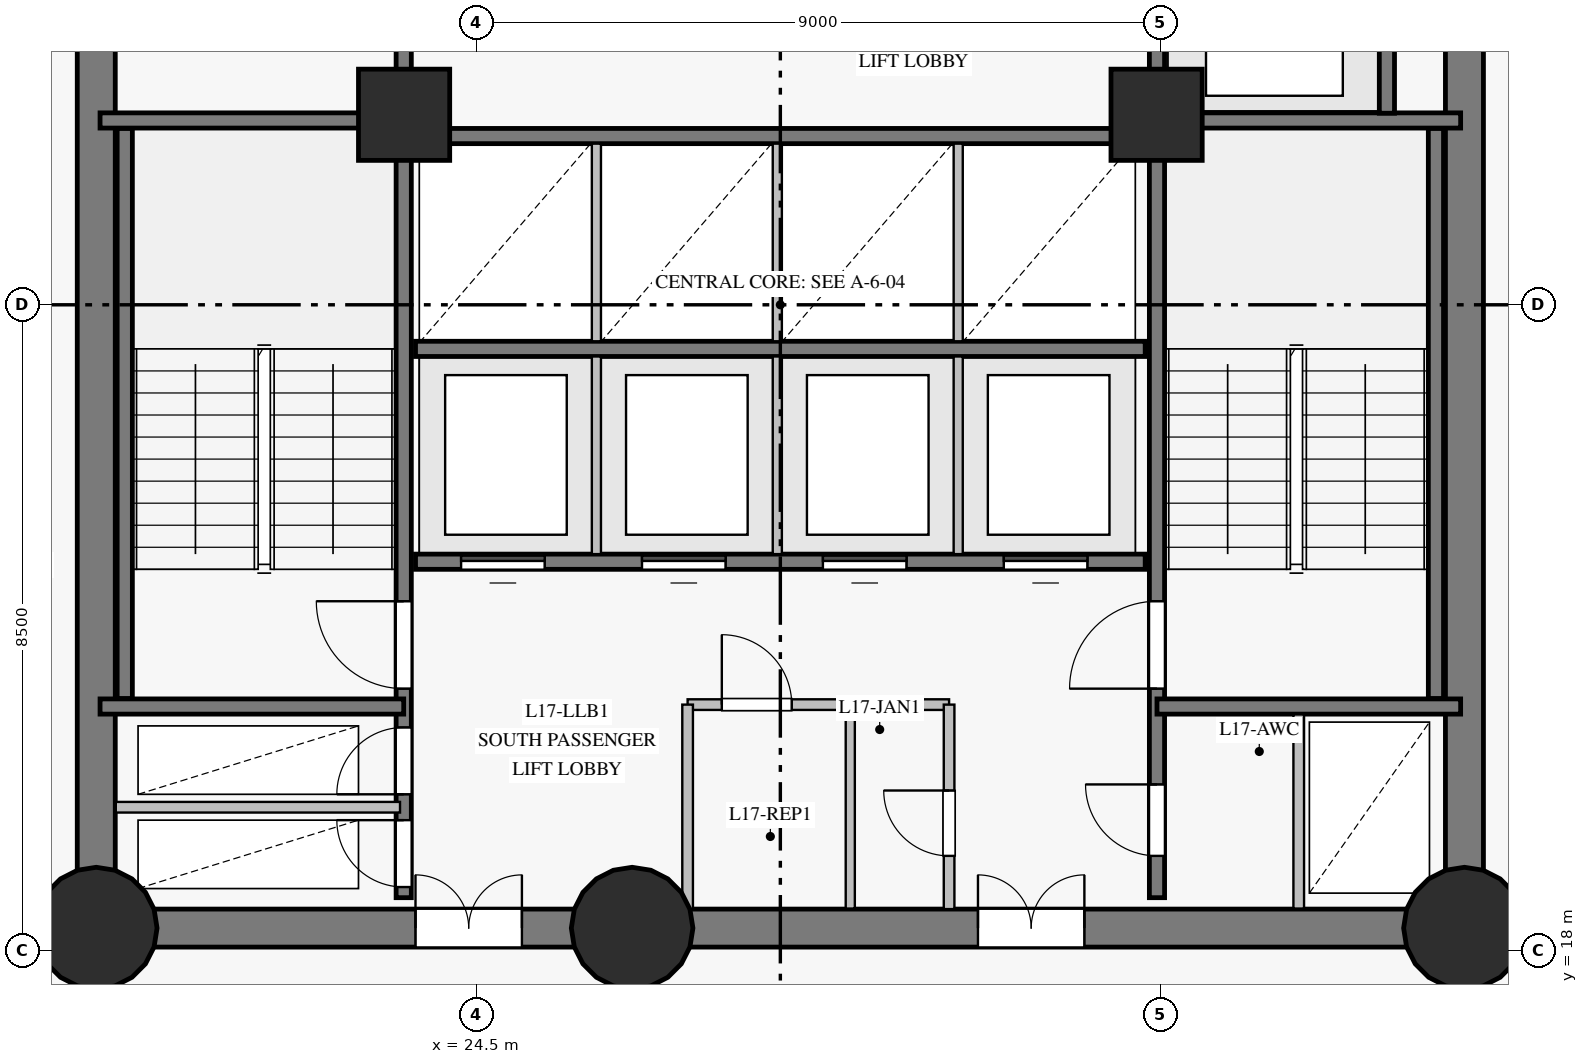
"""IFC4 building model, lengths in metres.
Left out: names, types, materials, properties, quantities, classifications, styles, units other than length and angle.
Written with IfcOpenShell. Run it as: python <this file> out.ifc"""

import sys

from ifc_helpers import new_model, si_unit, direction, frame, frame_2d, origin, origin_with_axes, origin_2d, place, context, subcontext, project, spatial, rectangle, circle, extrude, source, transform, mapped, element, fill, save


model = new_model("IFC4")
c1 = context("Model", 3, precision=1e-05, world=origin(), true_north=direction((0.0, 1.0)))
c2 = subcontext(c1, "Body", "Model", "MODEL_VIEW")
j1 = project(units=[si_unit("LENGTHUNIT", "METRE"), si_unit("PLANEANGLEUNIT", "RADIAN")], contexts=[c1])
p1 = place(None, origin())
s1 = spatial("IfcSite", under=j1, at=p1, CompositionType="ELEMENT")
p2 = place(p1, origin())
s2 = spatial("IfcBuilding", under=s1, at=p2, CompositionType="ELEMENT")
p3 = place(p2, frame((0.0, 0.0, 66.1)))
s3 = spatial("IfcBuildingStorey", under=s2, at=p3, CompositionType="ELEMENT", Elevation=66.1)
p4 = place(p3, frame((19.5, 18.3, 0.0), z_axis=(0.0, 0.0, 1.0), x_axis=(1.0, 0.0, 0.0)))
e1 = element("IfcWall", 1, at=p4, inside=s3, PredefinedType="SHEAR", context=c2, shape_type="SweptSolid", body=[
    extrude(rectangle(XDim=7.05, YDim=0.5, at=frame_2d((3.525, 0.0))), origin(), (0.0, 0.0, 1.0), 3.35),
])
p5 = place(p4, frame((4.2, 0.0, 0.0)))
e2 = element("IfcOpeningElement", 2, at=p5, cuts=e1, PredefinedType="OPENING", context=c2, shape_type="SweptSolid", body=[
    extrude(rectangle(XDim=1.4, YDim=2.2, at=frame_2d((0.7, 1.1))), frame((0.0, 0.26, 0.0), z_axis=(0.0, -1.0, 0.0), x_axis=(1.0, 0.0, 0.0)), (0.0, 0.0, 1.0), 0.52),
])
p6 = place(p3, frame((26.55, 18.3, 0.0), z_axis=(0.0, 0.0, 1.0), x_axis=(1.0, 0.0, 0.0)))
e3 = element("IfcWall", 3, at=p6, inside=s3, PredefinedType="SHEAR", context=c2, shape_type="SweptSolid", body=[
    extrude(rectangle(XDim=10.95, YDim=0.5, at=frame_2d((5.475, 0.0))), origin(), (0.0, 0.0, 1.0), 3.35),
])
p7 = place(p6, frame((4.55, 0.0, 0.0)))
e4 = element("IfcOpeningElement", 4, at=p7, cuts=e3, PredefinedType="OPENING", context=c2, shape_type="SweptSolid", body=[
    extrude(rectangle(XDim=1.4, YDim=2.2, at=frame_2d((0.7, 1.1))), frame((0.0, 0.26, 0.0), z_axis=(0.0, -1.0, 0.0), x_axis=(1.0, 0.0, 0.0)), (0.0, 0.0, 1.0), 0.52),
])
p8 = place(p3, frame((37.5, 18.3, 0.0), z_axis=(0.0, 0.0, 1.0), x_axis=(0.0, 1.0, 0.0)))
e5 = element("IfcWall", 5, at=p8, inside=s3, PredefinedType="SHEAR", context=c2, shape_type="SweptSolid", body=[
    extrude(rectangle(XDim=16.4, YDim=0.5, at=frame_2d((8.2, 0.0))), origin(), (0.0, 0.0, 1.0), 3.35),
])
p9 = place(p8, frame((14.06, 0.0, 0.0)))
e6 = element("IfcOpeningElement", 6, at=p9, cuts=e5, PredefinedType="OPENING", context=c2, shape_type="SweptSolid", body=[
    extrude(rectangle(XDim=1.2, YDim=2.15, at=frame_2d((0.6, 1.075))), frame((0.0, 0.26, 0.0), z_axis=(0.0, -1.0, 0.0), x_axis=(1.0, 0.0, 0.0)), (0.0, 0.0, 1.0), 0.52),
])
p10 = place(p3, frame((19.5, 34.7, 0.0), z_axis=(0.0, 0.0, 1.0), x_axis=(0.0, -1.0, 0.0)))
e7 = element("IfcWall", 7, at=p10, inside=s3, PredefinedType="SHEAR", context=c2, shape_type="SweptSolid", body=[
    extrude(rectangle(XDim=16.4, YDim=0.5, at=frame_2d((8.2, 0.0))), origin(), (0.0, 0.0, 1.0), 3.35),
])
p11 = place(p10, frame((3.1, 0.0, 0.0)))
e8 = element("IfcOpeningElement", 8, at=p11, cuts=e7, PredefinedType="OPENING", context=c2, shape_type="SweptSolid", body=[
    extrude(rectangle(XDim=1.1, YDim=2.15, at=frame_2d((0.55, 1.075))), frame((0.0, 0.26, 0.0), z_axis=(0.0, -1.0, 0.0), x_axis=(1.0, 0.0, 0.0)), (0.0, 0.0, 1.0), 0.52),
])
m1 = source(origin_with_axes(), c2, "Body", "SweptSolid", [
    extrude(circle(Radius=0.8, at=origin_2d()), origin(), (0.0, 0.0, 1.0), 3.6),
])
for number, where, z_axis, x_axis in (
    (9, (19.5, 18.3, 0.0), (0.0, 0.0, 1.0), (1.0, 0.0, 0.0)),
    (10, (26.55, 18.3, 0.0), (0.0, 0.0, 1.0), (1.0, 0.0, 0.0)),
    (11, (37.5, 18.3, 0.0), (0.0, 0.0, 1.0), (1.0, 0.0, 0.0)),
):
    element("IfcColumn", number, at=place(p3, frame(where, z_axis=z_axis, x_axis=x_axis)), inside=s3, PredefinedType="COLUMN", context=c2, shape_type="MappedRepresentation", body=[
        mapped(m1, transform((0.0, 0.0, 0.0), scale=1.0)),
    ])
m2 = source(origin_with_axes(), c2, "Body", "SweptSolid", [
    extrude(rectangle(XDim=1.2, YDim=1.2, at=origin_2d()), origin(), (0.0, 0.0, 1.0), 3.6),
])
for number, where, z_axis, x_axis in (
    (12, (23.55, 29.0, 0.0), (0.0, 0.0, 1.0), (1.0, 0.0, 0.0)),
    (13, (33.45, 29.0, 0.0), (0.0, 0.0, 1.0), (1.0, 0.0, 0.0)),
):
    element("IfcColumn", number, at=place(p3, frame(where, z_axis=z_axis, x_axis=x_axis)), inside=s3, PredefinedType="COLUMN", context=c2, shape_type="MappedRepresentation", body=[
        mapped(m2, transform((0.0, 0.0, 0.0), scale=1.0)),
    ])
p12 = place(p3, frame((23.545, 18.7, 0.0), z_axis=(0.0, 0.0, 1.0), x_axis=(0.0, 1.0, 0.0)))
e14 = element("IfcWall", 14, at=p12, inside=s3, PredefinedType="SHEAR", context=c2, shape_type="SweptSolid", body=[
    extrude(rectangle(XDim=15.6, YDim=0.2, at=frame_2d((7.8, 0.0))), origin(), (0.0, 0.0, 1.0), 3.35),
])
p13 = place(p12, frame((2.75, 0.0, 0.0)))
e15 = element("IfcOpeningElement", 15, at=p13, cuts=e14, PredefinedType="OPENING", context=c2, shape_type="SweptSolid", body=[
    extrude(rectangle(XDim=1.15, YDim=2.15, at=frame_2d((0.575, 1.075))), frame((0.0, 0.11, 0.0), z_axis=(0.0, -1.0, 0.0), x_axis=(1.0, 0.0, 0.0)), (0.0, 0.0, 1.0), 0.22),
])
p14 = place(p12, frame((0.14, 0.0, 0.0)))
e16 = element("IfcOpeningElement", 16, at=p14, cuts=e14, PredefinedType="OPENING", context=c2, shape_type="SweptSolid", body=[
    extrude(rectangle(XDim=0.88, YDim=2.1, at=frame_2d((0.44, 1.05))), frame((0.0, 0.11, 0.0), z_axis=(0.0, -1.0, 0.0), x_axis=(1.0, 0.0, 0.0)), (0.0, 0.0, 1.0), 0.22),
])
p15 = place(p12, frame((1.36, 0.0, 0.0)))
e17 = element("IfcOpeningElement", 17, at=p15, cuts=e14, PredefinedType="OPENING", context=c2, shape_type="SweptSolid", body=[
    extrude(rectangle(XDim=0.88, YDim=2.1, at=frame_2d((0.44, 1.05))), frame((0.0, 0.11, 0.0), z_axis=(0.0, -1.0, 0.0), x_axis=(1.0, 0.0, 0.0)), (0.0, 0.0, 1.0), 0.22),
])
p16 = place(p12, frame((12.1, 0.0, 0.0)))
e18 = element("IfcOpeningElement", 18, at=p16, cuts=e14, PredefinedType="OPENING", context=c2, shape_type="SweptSolid", body=[
    extrude(rectangle(XDim=1.12, YDim=2.15, at=frame_2d((0.56, 1.075))), frame((0.0, 0.11, 0.0), z_axis=(0.0, -1.0, 0.0), x_axis=(1.0, 0.0, 0.0)), (0.0, 0.0, 1.0), 0.22),
])
p17 = place(p12, frame((14.05, 0.0, 0.0)))
e19 = element("IfcOpeningElement", 19, at=p17, cuts=e14, PredefinedType="OPENING", context=c2, shape_type="SweptSolid", body=[
    extrude(rectangle(XDim=1.12, YDim=2.15, at=frame_2d((0.56, 1.075))), frame((0.0, 0.11, 0.0), z_axis=(0.0, -1.0, 0.0), x_axis=(1.0, 0.0, 0.0)), (0.0, 0.0, 1.0), 0.22),
])
p18 = place(p3, frame((33.455, 18.7, 0.0), z_axis=(0.0, 0.0, 1.0), x_axis=(0.0, 1.0, 0.0)))
e20 = element("IfcWall", 20, at=p18, inside=s3, PredefinedType="SHEAR", context=c2, shape_type="SweptSolid", body=[
    extrude(rectangle(XDim=15.6, YDim=0.2, at=frame_2d((7.8, 0.0))), origin(), (0.0, 0.0, 1.0), 3.35),
])
p19 = place(p18, frame((2.75, 0.0, 0.0)))
e21 = element("IfcOpeningElement", 21, at=p19, cuts=e20, PredefinedType="OPENING", context=c2, shape_type="SweptSolid", body=[
    extrude(rectangle(XDim=1.15, YDim=2.15, at=frame_2d((0.575, 1.075))), frame((0.0, 0.11, 0.0), z_axis=(0.0, -1.0, 0.0), x_axis=(1.0, 0.0, 0.0)), (0.0, 0.0, 1.0), 0.22),
])
p20 = place(p18, frame((0.55, 0.0, 0.0)))
e22 = element("IfcOpeningElement", 22, at=p20, cuts=e20, PredefinedType="OPENING", context=c2, shape_type="SweptSolid", body=[
    extrude(rectangle(XDim=0.94, YDim=2.1, at=frame_2d((0.47, 1.05))), frame((0.0, 0.11, 0.0), z_axis=(0.0, -1.0, 0.0), x_axis=(1.0, 0.0, 0.0)), (0.0, 0.0, 1.0), 0.22),
])
p21 = place(p3, frame((23.7, 23.12, 0.0), z_axis=(0.0, 0.0, 1.0), x_axis=(1.0, 0.0, 0.0)))
e23 = element("IfcWall", 23, at=p21, inside=s3, PredefinedType="SHEAR", context=c2, shape_type="SweptSolid", body=[
    extrude(rectangle(XDim=9.6, YDim=0.2, at=frame_2d((4.8, 0.0))), origin(), (0.0, 0.0, 1.0), 3.35),
])
p22 = place(p21, frame((0.6, 0.0, 0.0)))
e24 = element("IfcOpeningElement", 24, at=p22, cuts=e23, PredefinedType="OPENING", context=c2, shape_type="SweptSolid", body=[
    extrude(rectangle(XDim=1.1, YDim=2.15, at=frame_2d((0.55, 1.075))), frame((0.0, 0.11, 0.0), z_axis=(0.0, -1.0, 0.0), x_axis=(1.0, 0.0, 0.0)), (0.0, 0.0, 1.0), 0.22),
])
p23 = place(p21, frame((2.98, 0.0, 0.0)))
e25 = element("IfcOpeningElement", 25, at=p23, cuts=e23, PredefinedType="OPENING", context=c2, shape_type="SweptSolid", body=[
    extrude(rectangle(XDim=1.1, YDim=2.15, at=frame_2d((0.55, 1.075))), frame((0.0, 0.11, 0.0), z_axis=(0.0, -1.0, 0.0), x_axis=(1.0, 0.0, 0.0)), (0.0, 0.0, 1.0), 0.22),
])
p24 = place(p21, frame((5.36, 0.0, 0.0)))
e26 = element("IfcOpeningElement", 26, at=p24, cuts=e23, PredefinedType="OPENING", context=c2, shape_type="SweptSolid", body=[
    extrude(rectangle(XDim=1.1, YDim=2.15, at=frame_2d((0.55, 1.075))), frame((0.0, 0.11, 0.0), z_axis=(0.0, -1.0, 0.0), x_axis=(1.0, 0.0, 0.0)), (0.0, 0.0, 1.0), 0.22),
])
p25 = place(p21, frame((7.74, 0.0, 0.0)))
e27 = element("IfcOpeningElement", 27, at=p25, cuts=e23, PredefinedType="OPENING", context=c2, shape_type="SweptSolid", body=[
    extrude(rectangle(XDim=1.1, YDim=2.15, at=frame_2d((0.55, 1.075))), frame((0.0, 0.11, 0.0), z_axis=(0.0, -1.0, 0.0), x_axis=(1.0, 0.0, 0.0)), (0.0, 0.0, 1.0), 0.22),
])
for number, where, z_axis, x_axis in (
    (28, (23.7, 25.92, 0.0), (0.0, 0.0, 1.0), (1.0, 0.0, 0.0)),
    (29, (23.7, 28.72, 0.0), (0.0, 0.0, 1.0), (1.0, 0.0, 0.0)),
):
    element("IfcWall", number, at=place(p3, frame(where, z_axis=z_axis, x_axis=x_axis)), inside=s3, PredefinedType="SHEAR", context=c2, shape_type="SweptSolid", body=[
        extrude(rectangle(XDim=9.6, YDim=0.2, at=frame_2d((4.8, 0.0))), origin(), (0.0, 0.0, 1.0), 3.35),
    ])
for number, where, z_axis, x_axis in (
    (30, (19.875, 21.32, 0.0), (0.0, 0.0, 1.0), (0.0, 1.0, 0.0)),
    (31, (37.125, 21.32, 0.0), (0.0, 0.0, 1.0), (0.0, 1.0, 0.0)),
):
    element("IfcWall", number, at=place(p3, frame(where, z_axis=z_axis, x_axis=x_axis)), inside=s3, PredefinedType="SHEAR", context=c2, shape_type="SweptSolid", body=[
        extrude(rectangle(XDim=7.5, YDim=0.2, at=frame_2d((3.75, 0.0))), origin(), (0.0, 0.0, 1.0), 3.35),
    ])
for number, where, z_axis, x_axis in (
    (32, (33.455, 21.215, 0.0), (0.0, 0.0, 1.0), (1.0, 0.0, 0.0)),
    (33, (33.455, 28.925, 0.0), (0.0, 0.0, 1.0), (1.0, 0.0, 0.0)),
    (34, (19.55, 21.215, 0.0), (0.0, 0.0, 1.0), (1.0, 0.0, 0.0)),
    (35, (19.55, 28.925, 0.0), (0.0, 0.0, 1.0), (1.0, 0.0, 0.0)),
):
    element("IfcWall", number, at=place(p3, frame(where, z_axis=z_axis, x_axis=x_axis)), inside=s3, PredefinedType="SHEAR", context=c2, shape_type="SweptSolid", body=[
        extrude(rectangle(XDim=3.995, YDim=0.2, at=frame_2d((1.998, 0.0))), origin(), (0.0, 0.0, 1.0), 3.35),
    ])
p26 = place(p3, frame((36.48, 29.02, 0.0), z_axis=(0.0, 0.0, 1.0), x_axis=(0.0, 1.0, 0.0)))
e36 = element("IfcWall", 36, at=p26, inside=s3, PredefinedType="SHEAR", context=c2, shape_type="SweptSolid", body=[
    extrude(rectangle(XDim=2.86, YDim=0.2, at=frame_2d((1.43, 0.0))), origin(), (0.0, 0.0, 1.0), 3.35),
])
p27 = place(p3, frame((19.757, 19.89, 0.0), z_axis=(0.0, 0.0, 1.0), x_axis=(1.0, 0.0, 0.0)))
e37 = element("IfcWall", 37, at=p27, inside=s3, PredefinedType="PARTITIONING", context=c2, shape_type="SweptSolid", body=[
    extrude(rectangle(XDim=3.739, YDim=0.14, at=frame_2d((1.87, 0.0))), origin(), (0.0, 0.0, 1.0), 3.35),
])
p28 = place(p3, frame((27.28, 21.24, 0.0), z_axis=(0.0, 0.0, 1.0), x_axis=(1.0, 0.0, 0.0)))
e38 = element("IfcWall", 38, at=p28, inside=s3, PredefinedType="PARTITIONING", context=c2, shape_type="SweptSolid", body=[
    extrude(rectangle(XDim=3.44, YDim=0.14, at=frame_2d((1.72, 0.0))), origin(), (0.0, 0.0, 1.0), 3.35),
])
p29 = place(p28, frame((0.45, 0.0, 0.0)))
e39 = element("IfcOpeningElement", 39, at=p29, cuts=e38, PredefinedType="OPENING", context=c2, shape_type="SweptSolid", body=[
    extrude(rectangle(XDim=0.92, YDim=2.1, at=frame_2d((0.46, 1.05))), frame((0.0, 0.08, 0.0), z_axis=(0.0, -1.0, 0.0), x_axis=(1.0, 0.0, 0.0)), (0.0, 0.0, 1.0), 0.16),
])
p30 = place(p3, frame((27.28, 18.55, 0.0), z_axis=(0.0, 0.0, 1.0), x_axis=(0.0, 1.0, 0.0)))
e40 = element("IfcWall", 40, at=p30, inside=s3, PredefinedType="PARTITIONING", context=c2, shape_type="SweptSolid", body=[
    extrude(rectangle(XDim=2.69, YDim=0.14, at=frame_2d((1.345, 0.0))), origin(), (0.0, 0.0, 1.0), 3.35),
])
p31 = place(p3, frame((30.72, 18.55, 0.0), z_axis=(0.0, 0.0, 1.0), x_axis=(0.0, 1.0, 0.0)))
e41 = element("IfcWall", 41, at=p31, inside=s3, PredefinedType="PARTITIONING", context=c2, shape_type="SweptSolid", body=[
    extrude(rectangle(XDim=2.69, YDim=0.14, at=frame_2d((1.345, 0.0))), origin(), (0.0, 0.0, 1.0), 3.35),
])
p32 = place(p31, frame((0.7, 0.0, 0.0)))
e42 = element("IfcOpeningElement", 42, at=p32, cuts=e41, PredefinedType="OPENING", context=c2, shape_type="SweptSolid", body=[
    extrude(rectangle(XDim=0.86, YDim=2.1, at=frame_2d((0.43, 1.05))), frame((0.0, 0.08, 0.0), z_axis=(0.0, -1.0, 0.0), x_axis=(1.0, 0.0, 0.0)), (0.0, 0.0, 1.0), 0.16),
])
for number, where, z_axis, x_axis in (
    (43, (26.08, 23.22, 0.0), (0.0, 0.0, 1.0), (0.0, 1.0, 0.0)),
    (44, (28.46, 23.22, 0.0), (0.0, 0.0, 1.0), (0.0, 1.0, 0.0)),
    (45, (30.84, 23.22, 0.0), (0.0, 0.0, 1.0), (0.0, 1.0, 0.0)),
    (46, (26.08, 26.02, 0.0), (0.0, 0.0, 1.0), (0.0, 1.0, 0.0)),
    (47, (28.46, 26.02, 0.0), (0.0, 0.0, 1.0), (0.0, 1.0, 0.0)),
    (48, (30.84, 26.02, 0.0), (0.0, 0.0, 1.0), (0.0, 1.0, 0.0)),
):
    element("IfcWall", number, at=place(p3, frame(where, z_axis=z_axis, x_axis=x_axis)), inside=s3, PredefinedType="PARTITIONING", context=c2, shape_type="SweptSolid", body=[
        extrude(rectangle(XDim=2.6, YDim=0.12, at=frame_2d((1.3, 0.0))), origin(), (0.0, 0.0, 1.0), 3.35),
    ])
p33 = place(p3, frame((29.42, 18.557, 0.0), z_axis=(0.0, 0.0, 1.0), x_axis=(0.0, 1.0, 0.0)))
e49 = element("IfcWall", 49, at=p33, inside=s3, PredefinedType="PARTITIONING", context=c2, shape_type="SweptSolid", body=[
    extrude(rectangle(XDim=2.611, YDim=0.12, at=frame_2d((1.306, 0.0))), origin(), (0.0, 0.0, 1.0), 3.35),
])
p34 = place(p3, frame((35.32, 18.557, 0.0), z_axis=(0.0, 0.0, 1.0), x_axis=(0.0, 1.0, 0.0)))
e50 = element("IfcWall", 50, at=p34, inside=s3, PredefinedType="PARTITIONING", context=c2, shape_type="SweptSolid", body=[
    extrude(rectangle(XDim=2.553, YDim=0.14, at=frame_2d((1.277, 0.0))), origin(), (0.0, 0.0, 1.0), 3.35),
])
m3 = source(origin_with_axes(), c2, "Body", "SweptSolid", [
    extrude(rectangle(XDim=1.15, YDim=2.15, at=frame_2d((0.575, 1.075))), frame((0.0, 0.025, 0.0), z_axis=(0.0, -1.0, 0.0), x_axis=(1.0, 0.0, 0.0)), (0.0, 0.0, 1.0), 0.05),
])
p35 = place(p13, origin())
e51 = element("IfcDoor", 51, at=p35, inside=s3, OperationType="SINGLE_SWING_RIGHT", PredefinedType="DOOR", context=c2, shape_type="MappedRepresentation", body=[
    mapped(m3, transform((0.0, 0.0, 0.0), scale=1.0)),
])
fill(e15, e51)
p36 = place(p19, origin())
e52 = element("IfcDoor", 52, at=p36, inside=s3, OperationType="SINGLE_SWING_LEFT", PredefinedType="DOOR", context=c2, shape_type="MappedRepresentation", body=[
    mapped(m3, transform((0.0, 0.0, 0.0), scale=1.0)),
])
fill(e21, e52)
m4 = source(origin_with_axes(), c2, "Body", "SweptSolid", [
    extrude(rectangle(XDim=0.88, YDim=2.1, at=frame_2d((0.44, 1.05))), frame((0.0, 0.025, 0.0), z_axis=(0.0, -1.0, 0.0), x_axis=(1.0, 0.0, 0.0)), (0.0, 0.0, 1.0), 0.05),
])
p37 = place(p14, origin())
e53 = element("IfcDoor", 53, at=p37, inside=s3, OperationType="SINGLE_SWING_RIGHT", PredefinedType="DOOR", context=c2, shape_type="MappedRepresentation", body=[
    mapped(m4, transform((0.0, 0.0, 0.0), scale=1.0)),
])
fill(e16, e53)
p38 = place(p15, origin())
e54 = element("IfcDoor", 54, at=p38, inside=s3, OperationType="SINGLE_SWING_LEFT", PredefinedType="DOOR", context=c2, shape_type="MappedRepresentation", body=[
    mapped(m4, transform((0.0, 0.0, 0.0), scale=1.0)),
])
fill(e17, e54)
m5 = source(origin_with_axes(), c2, "Body", "SweptSolid", [
    extrude(rectangle(XDim=1.4, YDim=2.2, at=frame_2d((0.7, 1.1))), frame((0.0, 0.025, 0.0), z_axis=(0.0, -1.0, 0.0), x_axis=(1.0, 0.0, 0.0)), (0.0, 0.0, 1.0), 0.05),
])
p39 = place(p5, origin())
e55 = element("IfcDoor", 55, at=p39, inside=s3, OperationType="DOUBLE_DOOR_SINGLE_SWING", PredefinedType="DOOR", context=c2, shape_type="MappedRepresentation", body=[
    mapped(m5, transform((0.0, 0.0, 0.0), scale=1.0)),
])
fill(e2, e55)
p40 = place(p7, origin())
e56 = element("IfcDoor", 56, at=p40, inside=s3, OperationType="DOUBLE_DOOR_SINGLE_SWING", PredefinedType="DOOR", context=c2, shape_type="MappedRepresentation", body=[
    mapped(m5, transform((0.0, 0.0, 0.0), scale=1.0)),
])
fill(e4, e56)
m6 = source(origin_with_axes(), c2, "Body", "SweptSolid", [
    extrude(rectangle(XDim=0.94, YDim=2.1, at=frame_2d((0.47, 1.05))), frame((0.0, 0.025, 0.0), z_axis=(0.0, -1.0, 0.0), x_axis=(1.0, 0.0, 0.0)), (0.0, 0.0, 1.0), 0.05),
])
p41 = place(p20, origin())
e57 = element("IfcDoor", 57, at=p41, inside=s3, OperationType="SINGLE_SWING_RIGHT", PredefinedType="DOOR", context=c2, shape_type="MappedRepresentation", body=[
    mapped(m6, transform((0.0, 0.0, 0.0), scale=1.0)),
])
fill(e22, e57)
m7 = source(origin_with_axes(), c2, "Body", "SweptSolid", [
    extrude(rectangle(XDim=0.92, YDim=2.1, at=frame_2d((0.46, 1.05))), frame((0.0, 0.025, 0.0), z_axis=(0.0, -1.0, 0.0), x_axis=(1.0, 0.0, 0.0)), (0.0, 0.0, 1.0), 0.05),
])
p42 = place(p29, origin())
e58 = element("IfcDoor", 58, at=p42, inside=s3, OperationType="SINGLE_SWING_LEFT", PredefinedType="DOOR", context=c2, shape_type="MappedRepresentation", body=[
    mapped(m7, transform((0.0, 0.0, 0.0), scale=1.0)),
])
fill(e39, e58)
m8 = source(origin_with_axes(), c2, "Body", "SweptSolid", [
    extrude(rectangle(XDim=0.86, YDim=2.1, at=frame_2d((0.43, 1.05))), frame((0.0, 0.025, 0.0), z_axis=(0.0, -1.0, 0.0), x_axis=(1.0, 0.0, 0.0)), (0.0, 0.0, 1.0), 0.05),
])
p43 = place(p32, origin())
e59 = element("IfcDoor", 59, at=p43, inside=s3, OperationType="SINGLE_SWING_RIGHT", PredefinedType="DOOR", context=c2, shape_type="MappedRepresentation", body=[
    mapped(m8, transform((0.0, 0.0, 0.0), scale=1.0)),
])
fill(e42, e59)
m9 = source(origin_with_axes(), c2, "Body", "SweptSolid", [
    extrude(rectangle(XDim=1.1, YDim=2.15, at=frame_2d((0.55, 1.075))), frame((0.0, 0.025, 0.0), z_axis=(0.0, -1.0, 0.0), x_axis=(1.0, 0.0, 0.0)), (0.0, 0.0, 1.0), 0.05),
])
p44 = place(p22, origin())
e60 = element("IfcDoor", 60, at=p44, inside=s3, OperationType="SLIDING_TO_LEFT", PredefinedType="DOOR", context=c2, shape_type="MappedRepresentation", body=[
    mapped(m9, transform((0.0, 0.0, 0.0), scale=1.0)),
])
fill(e24, e60)
p45 = place(p23, origin())
e61 = element("IfcDoor", 61, at=p45, inside=s3, OperationType="SLIDING_TO_RIGHT", PredefinedType="DOOR", context=c2, shape_type="MappedRepresentation", body=[
    mapped(m9, transform((0.0, 0.0, 0.0), scale=1.0)),
])
fill(e25, e61)
p46 = place(p24, origin())
e62 = element("IfcDoor", 62, at=p46, inside=s3, OperationType="SLIDING_TO_LEFT", PredefinedType="DOOR", context=c2, shape_type="MappedRepresentation", body=[
    mapped(m9, transform((0.0, 0.0, 0.0), scale=1.0)),
])
fill(e26, e62)
p47 = place(p25, origin())
e63 = element("IfcDoor", 63, at=p47, inside=s3, OperationType="SLIDING_TO_RIGHT", PredefinedType="DOOR", context=c2, shape_type="MappedRepresentation", body=[
    mapped(m9, transform((0.0, 0.0, 0.0), scale=1.0)),
])
fill(e27, e63)
save(model, sys.argv[1])
